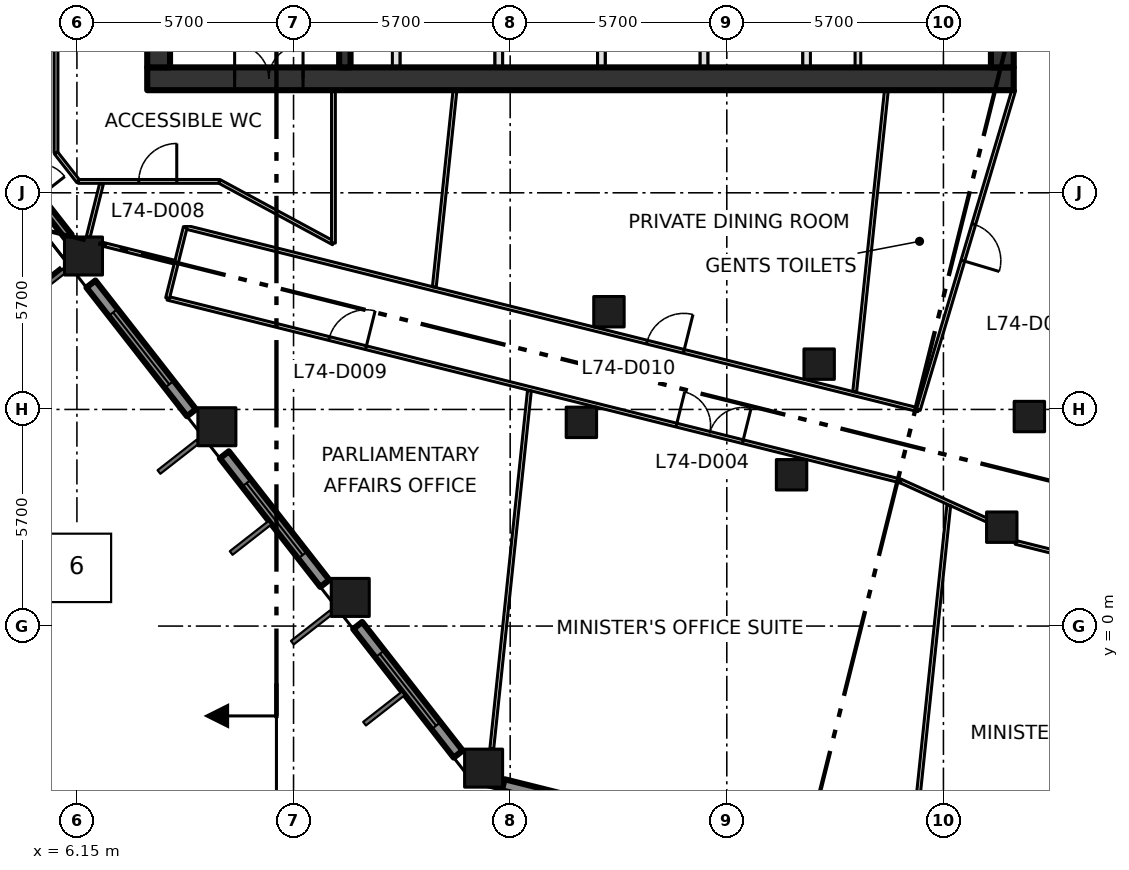
"""IFC4 building model, lengths in metres.
Left out: names, types, materials, properties, quantities, classifications, styles, units other than length and angle.
Written with IfcOpenShell. Run it as: python <this file> out.ifc"""

import sys

from ifc_helpers import new_model, si_unit, direction, frame, frame_2d, origin, origin_2d, place, context, subcontext, project, spatial, rectangle, extrude, element, fill, save


model = new_model("IFC4")
c1 = context("Model", 3, precision=1e-05, world=origin(), true_north=direction((0.0, 1.0)))
c2 = subcontext(c1, "Body", "Model", "MODEL_VIEW")
j1 = project(units=[si_unit("LENGTHUNIT", "METRE"), si_unit("PLANEANGLEUNIT", "RADIAN")], contexts=[c1])
p1 = place(None, origin())
s1 = spatial("IfcSite", under=j1, at=p1, CompositionType="ELEMENT")
p2 = place(p1, origin())
s2 = spatial("IfcBuilding", under=s1, at=p2, CompositionType="ELEMENT")
p3 = place(p2, frame((0.0, 0.0, 323.4)))
s3 = spatial("IfcBuildingStorey", under=s2, at=p3, CompositionType="ELEMENT", Elevation=323.4)
for number, where, z_axis, x_axis in (
    (1, (16.851, -3.738, 0.0), (0.0, 0.0, 1.0), (1.0, 0.0, 0.0)),
    (2, (13.342, 0.754, 0.0), (0.0, 0.0, 1.0), (1.0, 0.0, 0.0)),
    (3, (9.833, 5.245, 0.0), (0.0, 0.0, 1.0), (1.0, 0.0, 0.0)),
    (4, (6.323, 9.737, 0.0), (0.0, 0.0, 1.0), (1.0, 0.0, 0.0)),
):
    element("IfcColumn", number, at=place(p3, frame(where, z_axis=z_axis, x_axis=x_axis)), inside=s3, PredefinedType="COLUMN", context=c2, shape_type="SweptSolid", body=[
        extrude(rectangle(XDim=1.0, YDim=1.0, at=origin_2d()), origin(), (0.0, 0.0, 1.0), 4.2),
    ])
for number, where, z_axis, x_axis in (
    (5, (19.424, 5.36, 0.0), (0.0, 0.0, 1.0), (1.0, 0.0, 0.0)),
    (6, (24.954, 3.981, 0.0), (0.0, 0.0, 1.0), (1.0, 0.0, 0.0)),
    (7, (30.485, 2.602, 0.0), (0.0, 0.0, 1.0), (1.0, 0.0, 0.0)),
    (8, (20.149, 8.271, 0.0), (0.0, 0.0, 1.0), (1.0, 0.0, 0.0)),
    (9, (25.68, 6.892, 0.0), (0.0, 0.0, 1.0), (1.0, 0.0, 0.0)),
    (10, (31.211, 5.513, 0.0), (0.0, 0.0, 1.0), (1.0, 0.0, 0.0)),
):
    element("IfcColumn", number, at=place(p3, frame(where, z_axis=z_axis, x_axis=x_axis)), inside=s3, PredefinedType="COLUMN", context=c2, shape_type="SweptSolid", body=[
        extrude(rectangle(XDim=0.8, YDim=0.8, at=origin_2d()), origin(), (0.0, 0.0, 1.0), 4.2),
    ])
p4 = place(p3, frame((8.0, 14.4, -0.3), z_axis=(0.0, 0.0, 1.0), x_axis=(1.0, 0.0, 0.0)))
e11 = element("IfcWall", 11, at=p4, inside=s3, PredefinedType="SHEAR", context=c2, shape_type="SweptSolid", body=[
    extrude(rectangle(XDim=22.8, YDim=0.6, at=frame_2d((11.4, 0.0))), origin(), (0.0, 0.0, 1.0), 4.2),
])
p5 = place(p4, frame((2.3, 0.0, 0.3)))
e12 = element("IfcOpeningElement", 12, at=p5, cuts=e11, PredefinedType="OPENING", context=c2, shape_type="SweptSolid", body=[
    extrude(rectangle(XDim=1.8, YDim=2.1, at=frame_2d((0.9, 1.05))), frame((0.0, 0.31, 0.0), z_axis=(0.0, -1.0, 0.0), x_axis=(1.0, 0.0, 0.0)), (0.0, 0.0, 1.0), 0.62),
])
for number, where, z_axis, x_axis in (
    (13, (8.3, 14.7, -0.3), (0.0, 0.0, 1.0), (0.0, 1.0, 0.0)),
    (14, (30.5, 14.7, -0.3), (0.0, 0.0, 1.0), (0.0, 1.0, 0.0)),
):
    element("IfcWall", number, at=place(p3, frame(where, z_axis=z_axis, x_axis=x_axis)), inside=s3, PredefinedType="SHEAR", context=c2, shape_type="SweptSolid", body=[
        extrude(rectangle(XDim=21.0, YDim=0.6, at=frame_2d((10.5, 0.0))), origin(), (0.0, 0.0, 1.0), 4.2),
    ])
p6 = place(p3, frame((13.2, 14.7, 0.0), z_axis=(0.0, 0.0, 1.0), x_axis=(0.0, 1.0, 0.0)))
e15 = element("IfcWall", 15, at=p6, inside=s3, PredefinedType="SHEAR", context=c2, shape_type="SweptSolid", body=[
    extrude(rectangle(XDim=21.0, YDim=0.3, at=frame_2d((10.5, 0.0))), origin(), (0.0, 0.0, 1.0), 3.9),
])
p7 = place(p6, frame((3.6, 0.0, 0.0)))
e16 = element("IfcOpeningElement", 16, at=p7, cuts=e15, PredefinedType="OPENING", context=c2, shape_type="SweptSolid", body=[
    extrude(rectangle(XDim=1.8, YDim=2.1, at=frame_2d((0.9, 1.05))), frame((0.0, 0.16, 0.0), z_axis=(0.0, -1.0, 0.0), x_axis=(1.0, 0.0, 0.0)), (0.0, 0.0, 1.0), 0.32),
])
p8 = place(p6, frame((11.7, 0.0, 0.0)))
e17 = element("IfcOpeningElement", 17, at=p8, cuts=e15, PredefinedType="OPENING", context=c2, shape_type="SweptSolid", body=[
    extrude(rectangle(XDim=1.2, YDim=2.1, at=frame_2d((0.6, 1.05))), frame((0.0, 0.16, 0.0), z_axis=(0.0, -1.0, 0.0), x_axis=(1.0, 0.0, 0.0)), (0.0, 0.0, 1.0), 0.32),
])
for number, where, z_axis, x_axis in (
    (18, (14.55, 14.7, 0.0), (0.0, 0.0, 1.0), (0.0, 1.0, 0.0)),
    (19, (17.25, 14.7, 0.0), (0.0, 0.0, 1.0), (0.0, 1.0, 0.0)),
    (20, (19.95, 14.7, 0.0), (0.0, 0.0, 1.0), (0.0, 1.0, 0.0)),
    (21, (22.65, 14.7, 0.0), (0.0, 0.0, 1.0), (0.0, 1.0, 0.0)),
    (22, (25.35, 14.7, 0.0), (0.0, 0.0, 1.0), (0.0, 1.0, 0.0)),
):
    element("IfcWall", number, at=place(p3, frame(where, z_axis=z_axis, x_axis=x_axis)), inside=s3, PredefinedType="SOLIDWALL", context=c2, shape_type="SweptSolid", body=[
        extrude(rectangle(XDim=2.9, YDim=0.2, at=frame_2d((1.45, 0.0))), origin(), (0.0, 0.0, 1.0), 3.9),
    ])
p9 = place(p3, frame((26.7, 14.7, 0.0), z_axis=(0.0, 0.0, 1.0), x_axis=(0.0, 1.0, 0.0)))
e23 = element("IfcWall", 23, at=p9, inside=s3, PredefinedType="PARTITIONING", context=c2, shape_type="SweptSolid", body=[
    extrude(rectangle(XDim=2.9, YDim=0.15, at=frame_2d((1.45, 0.0))), origin(), (0.0, 0.0, 1.0), 3.9),
])
p10 = place(p3, frame((3.205, 13.729, 0.0), z_axis=(0.0, 0.0, 1.0), x_axis=(0.615636557784, -0.788030220689, 0.0)))
e24 = element("IfcWall", 24, at=p10, inside=s3, PredefinedType="SOLIDWALL", context=c2, shape_type="SweptSolid", body=[
    extrude(rectangle(XDim=4.431, YDim=0.2, at=frame_2d((2.216, 0.0))), origin(), (0.0, 0.0, 1.0), 3.2),
])
p11 = place(p10, frame((1.315, 0.0, 0.0)))
e25 = element("IfcOpeningElement", 25, at=p11, cuts=e24, PredefinedType="OPENING", context=c2, shape_type="SweptSolid", body=[
    extrude(rectangle(XDim=1.8, YDim=2.9, at=frame_2d((0.9, 1.45))), frame((0.0, 0.11, 0.0), z_axis=(0.0, -1.0, 0.0), x_axis=(1.0, 0.0, 0.0)), (0.0, 0.0, 1.0), 0.22),
])
p12 = place(p3, frame((6.519, 9.0, 0.0), z_axis=(0.0, 0.0, 1.0), x_axis=(0.615634121154, -0.788032124263, 0.0)))
e26 = element("IfcWall", 26, at=p12, inside=s3, PredefinedType="SOLIDWALL", context=c2, shape_type="SweptSolid", body=[
    extrude(rectangle(XDim=4.298, YDim=0.3, at=frame_2d((2.149, 0.0))), origin(), (0.0, 0.0, 1.0), 3.2),
])
p13 = place(p12, frame((0.949, 0.0, 0.8)))
e27 = element("IfcOpeningElement", 27, at=p13, cuts=e26, PredefinedType="OPENING", context=c2, shape_type="SweptSolid", body=[
    extrude(rectangle(XDim=2.4, YDim=2.1, at=frame_2d((1.2, 1.05))), frame((0.0, 0.16, 0.0), z_axis=(0.0, -1.0, 0.0), x_axis=(1.0, 0.0, 0.0)), (0.0, 0.0, 1.0), 0.32),
])
p14 = place(p3, frame((10.029, 4.507, 0.0), z_axis=(0.0, 0.0, 1.0), x_axis=(0.615572343689, -0.788080382756, 0.0)))
e28 = element("IfcWall", 28, at=p14, inside=s3, PredefinedType="SOLIDWALL", context=c2, shape_type="SweptSolid", body=[
    extrude(rectangle(XDim=4.295, YDim=0.3, at=frame_2d((2.147, 0.0))), origin(), (0.0, 0.0, 1.0), 3.2),
])
p15 = place(p14, frame((0.948, 0.0, 0.8)))
e29 = element("IfcOpeningElement", 29, at=p15, cuts=e28, PredefinedType="OPENING", context=c2, shape_type="SweptSolid", body=[
    extrude(rectangle(XDim=2.4, YDim=2.1, at=frame_2d((1.2, 1.05))), frame((0.0, 0.16, 0.0), z_axis=(0.0, -1.0, 0.0), x_axis=(1.0, 0.0, 0.0)), (0.0, 0.0, 1.0), 0.32),
])
p16 = place(p3, frame((13.538, 0.016, 0.0), z_axis=(0.0, 0.0, 1.0), x_axis=(0.615713519567, -0.787970089421, 0.0)))
e30 = element("IfcWall", 30, at=p16, inside=s3, PredefinedType="SOLIDWALL", context=c2, shape_type="SweptSolid", body=[
    extrude(rectangle(XDim=4.296, YDim=0.3, at=frame_2d((2.148, 0.0))), origin(), (0.0, 0.0, 1.0), 3.2),
])
p17 = place(p16, frame((0.948, 0.0, 0.8)))
e31 = element("IfcOpeningElement", 31, at=p17, cuts=e30, PredefinedType="OPENING", context=c2, shape_type="SweptSolid", body=[
    extrude(rectangle(XDim=2.4, YDim=2.1, at=frame_2d((1.2, 1.05))), frame((0.0, 0.16, 0.0), z_axis=(0.0, -1.0, 0.0), x_axis=(1.0, 0.0, 0.0)), (0.0, 0.0, 1.0), 0.32),
])
p18 = place(p3, frame((17.367, -4.176, 0.0), z_axis=(0.0, 0.0, 1.0), x_axis=(0.970327846266, -0.241793032904, 0.0)))
e32 = element("IfcWall", 32, at=p18, inside=s3, PredefinedType="SOLIDWALL", context=c2, shape_type="SweptSolid", body=[
    extrude(rectangle(XDim=4.487, YDim=0.3, at=frame_2d((2.244, 0.0))), origin(), (0.0, 0.0, 1.0), 3.2),
])
p19 = place(p18, frame((1.044, 0.0, 0.8)))
e33 = element("IfcOpeningElement", 33, at=p19, cuts=e32, PredefinedType="OPENING", context=c2, shape_type="SweptSolid", body=[
    extrude(rectangle(XDim=2.4, YDim=2.1, at=frame_2d((1.2, 1.05))), frame((0.0, 0.16, 0.0), z_axis=(0.0, -1.0, 0.0), x_axis=(1.0, 0.0, 0.0)), (0.0, 0.0, 1.0), 0.32),
])
p20 = place(p3, frame((5.6, 12.45, 0.0), z_axis=(0.0, 0.0, 1.0), x_axis=(0.0, 1.0, 0.0)))
e34 = element("IfcWall", 34, at=p20, inside=s3, PredefinedType="PARTITIONING", context=c2, shape_type="SweptSolid", body=[
    extrude(rectangle(XDim=26.85, YDim=0.1, at=frame_2d((13.425, 0.0))), origin(), (0.0, 0.0, 1.0), 3.9),
])
p21 = place(p20, frame((5.38, 0.0, 0.0)))
e35 = element("IfcOpeningElement", 35, at=p21, cuts=e34, PredefinedType="OPENING", context=c2, shape_type="SweptSolid", body=[
    extrude(rectangle(XDim=1.0, YDim=2.1, at=frame_2d((0.5, 1.05))), frame((0.0, 0.06, 0.0), z_axis=(0.0, -1.0, 0.0), x_axis=(1.0, 0.0, 0.0)), (0.0, 0.0, 1.0), 0.12),
])
p22 = place(p20, frame((16.639, 0.0, 0.0)))
e36 = element("IfcOpeningElement", 36, at=p22, cuts=e34, PredefinedType="OPENING", context=c2, shape_type="SweptSolid", body=[
    extrude(rectangle(XDim=1.0, YDim=2.1, at=frame_2d((0.5, 1.05))), frame((0.0, 0.06, 0.0), z_axis=(0.0, -1.0, 0.0), x_axis=(1.0, 0.0, 0.0)), (0.0, 0.0, 1.0), 0.12),
])
p23 = place(p20, frame((24.139, 0.0, 0.0)))
e37 = element("IfcOpeningElement", 37, at=p23, cuts=e34, PredefinedType="OPENING", context=c2, shape_type="SweptSolid", body=[
    extrude(rectangle(XDim=1.0, YDim=2.1, at=frame_2d((0.5, 1.05))), frame((0.0, 0.06, 0.0), z_axis=(0.0, -1.0, 0.0), x_axis=(1.0, 0.0, 0.0)), (0.0, 0.0, 1.0), 0.12),
])
p24 = place(p3, frame((5.6, 12.45, 0.0), z_axis=(0.0, 0.0, 1.0), x_axis=(0.615644041972, -0.788024373725, 0.0)))
e38 = element("IfcWall", 38, at=p24, inside=s3, PredefinedType="PARTITIONING", context=c2, shape_type="SweptSolid", body=[
    extrude(rectangle(XDim=0.952, YDim=0.1, at=frame_2d((0.476, 0.0))), origin(), (0.0, 0.0, 1.0), 3.9),
])
p25 = place(p3, frame((6.186, 11.7, 0.0), z_axis=(0.0, 0.0, 1.0), x_axis=(1.0, 0.0, 0.0)))
e39 = element("IfcWall", 39, at=p25, inside=s3, PredefinedType="PARTITIONING", context=c2, shape_type="SweptSolid", body=[
    extrude(rectangle(XDim=3.714, YDim=0.1, at=frame_2d((1.857, 0.0))), origin(), (0.0, 0.0, 1.0), 3.9),
])
p26 = place(p25, frame((1.591, 0.0, 0.0)))
e40 = element("IfcOpeningElement", 40, at=p26, cuts=e39, PredefinedType="OPENING", context=c2, shape_type="SweptSolid", body=[
    extrude(rectangle(XDim=1.0, YDim=2.1, at=frame_2d((0.5, 1.05))), frame((0.0, 0.06, 0.0), z_axis=(0.0, -1.0, 0.0), x_axis=(1.0, 0.0, 0.0)), (0.0, 0.0, 1.0), 0.12),
])
p27 = place(p3, frame((8.535, 8.626, 0.0), z_axis=(0.0, 0.0, 1.0), x_axis=(0.970298340477, -0.241911410372, 0.0)))
e41 = element("IfcWall", 41, at=p27, inside=s3, PredefinedType="PARTITIONING", context=c2, shape_type="SweptSolid", body=[
    extrude(rectangle(XDim=19.88, YDim=0.1, at=frame_2d((9.94, 0.0))), origin(), (0.0, 0.0, 1.0), 3.9),
])
p28 = place(p27, frame((13.799, 0.0, 0.0)))
e42 = element("IfcOpeningElement", 42, at=p28, cuts=e41, PredefinedType="OPENING", context=c2, shape_type="SweptSolid", body=[
    extrude(rectangle(XDim=1.8, YDim=2.1, at=frame_2d((0.9, 1.05))), frame((0.0, 0.06, 0.0), z_axis=(0.0, -1.0, 0.0), x_axis=(1.0, 0.0, 0.0)), (0.0, 0.0, 1.0), 0.12),
])
p29 = place(p27, frame((4.38, 0.0, 0.0)))
e43 = element("IfcOpeningElement", 43, at=p29, cuts=e41, PredefinedType="OPENING", context=c2, shape_type="SweptSolid", body=[
    extrude(rectangle(XDim=1.0, YDim=2.1, at=frame_2d((0.5, 1.05))), frame((0.0, 0.06, 0.0), z_axis=(0.0, -1.0, 0.0), x_axis=(1.0, 0.0, 0.0)), (0.0, 0.0, 1.0), 0.12),
])
p30 = place(p3, frame((9.002, 10.499, 0.0), z_axis=(0.0, 0.0, 1.0), x_axis=(0.970298340477, -0.241911410372, 0.0)))
e44 = element("IfcWall", 44, at=p30, inside=s3, PredefinedType="PARTITIONING", context=c2, shape_type="SweptSolid", body=[
    extrude(rectangle(XDim=19.88, YDim=0.1, at=frame_2d((9.94, 0.0))), origin(), (0.0, 0.0, 1.0), 3.9),
])
p31 = place(p30, frame((12.518, 0.0, 0.0)))
e45 = element("IfcOpeningElement", 45, at=p31, cuts=e44, PredefinedType="OPENING", context=c2, shape_type="SweptSolid", body=[
    extrude(rectangle(XDim=1.0, YDim=2.1, at=frame_2d((0.5, 1.05))), frame((0.0, 0.06, 0.0), z_axis=(0.0, -1.0, 0.0), x_axis=(1.0, 0.0, 0.0)), (0.0, 0.0, 1.0), 0.12),
])
p32 = place(p3, frame((9.002, 10.499, 0.0), z_axis=(0.0, 0.0, 1.0), x_axis=(-0.241940418317, -0.970291107856, 0.0)))
e46 = element("IfcWall", 46, at=p32, inside=s3, PredefinedType="PARTITIONING", context=c2, shape_type="SweptSolid", body=[
    extrude(rectangle(XDim=1.93, YDim=0.1, at=frame_2d((0.965, 0.0))), origin(), (0.0, 0.0, 1.0), 3.9),
])
p33 = place(p3, frame((9.9, 11.7, 0.0), z_axis=(0.0, 0.0, 1.0), x_axis=(0.87965147249, -0.475618846291, 0.0)))
e47 = element("IfcWall", 47, at=p33, inside=s3, PredefinedType="PARTITIONING", context=c2, shape_type="SweptSolid", body=[
    extrude(rectangle(XDim=3.41, YDim=0.1, at=frame_2d((1.705, 0.0))), origin(), (0.0, 0.0, 1.0), 3.9),
])
p34 = place(p3, frame((12.9, 10.078, 0.0), z_axis=(0.0, 0.0, 1.0), x_axis=(0.0, 1.0, 0.0)))
e48 = element("IfcWall", 48, at=p34, inside=s3, PredefinedType="PARTITIONING", context=c2, shape_type="SweptSolid", body=[
    extrude(rectangle(XDim=4.022, YDim=0.1, at=frame_2d((2.011, 0.0))), origin(), (0.0, 0.0, 1.0), 3.9),
])
p35 = place(p3, frame((27.824, 3.817, 0.0), z_axis=(0.0, 0.0, 1.0), x_axis=(0.910793734201, -0.41286168839, 0.0)))
e49 = element("IfcWall", 49, at=p35, inside=s3, PredefinedType="PARTITIONING", context=c2, shape_type="SweptSolid", body=[
    extrude(rectangle(XDim=2.482, YDim=0.1, at=frame_2d((1.241, 0.0))), origin(), (0.0, 0.0, 1.0), 3.9),
])
p36 = place(p3, frame((30.8, 14.1, 0.0), z_axis=(0.0, 0.0, 1.0), x_axis=(-0.28588265334, -0.958264633867, 0.0)))
e50 = element("IfcWall", 50, at=p36, inside=s3, PredefinedType="PARTITIONING", context=c2, shape_type="SweptSolid", body=[
    extrude(rectangle(XDim=8.776, YDim=0.1, at=frame_2d((4.388, 0.0))), origin(), (0.0, 0.0, 1.0), 3.9),
])
p37 = place(p36, frame((3.68, 0.0, 0.0)))
e51 = element("IfcOpeningElement", 51, at=p37, cuts=e50, PredefinedType="OPENING", context=c2, shape_type="SweptSolid", body=[
    extrude(rectangle(XDim=1.0, YDim=2.1, at=frame_2d((0.5, 1.05))), frame((0.0, 0.06, 0.0), z_axis=(0.0, -1.0, 0.0), x_axis=(1.0, 0.0, 0.0)), (0.0, 0.0, 1.0), 0.12),
])
p38 = place(p3, frame((30.849, 2.202, 0.0), z_axis=(0.0, 0.0, 1.0), x_axis=(0.970320559999, -0.241822271189, 0.0)))
e52 = element("IfcWall", 52, at=p38, inside=s3, PredefinedType="PARTITIONING", context=c2, shape_type="SweptSolid", body=[
    extrude(rectangle(XDim=4.913, YDim=0.1, at=frame_2d((2.456, 0.0))), origin(), (0.0, 0.0, 1.0), 3.9),
])
p39 = place(p3, frame((6.797, 11.638, 0.0), z_axis=(0.0, 0.0, 1.0), x_axis=(-0.242456058691, -0.970162388265, 0.0)))
e53 = element("IfcWall", 53, at=p39, inside=s3, PredefinedType="PARTITIONING", context=c2, shape_type="SweptSolid", body=[
    extrude(rectangle(XDim=1.444, YDim=0.1, at=frame_2d((0.722, 0.0))), origin(), (0.0, 0.0, 1.0), 3.9),
])
p40 = place(p3, frame((8.72, 9.575, 0.0), z_axis=(0.0, 0.0, 1.0), x_axis=(-0.970274576003, 0.242006708918, 0.0)))
e54 = element("IfcWall", 54, at=p40, inside=s3, PredefinedType="PARTITIONING", context=c2, shape_type="SweptSolid", body=[
    extrude(rectangle(XDim=1.955, YDim=0.1, at=frame_2d((0.978, 0.0))), origin(), (0.0, 0.0, 1.0), 3.9),
])
p41 = place(p3, frame((15.554, 8.924, 0.0), z_axis=(0.0, 0.0, 1.0), x_axis=(0.104513853303, 0.994523430829, 0.0)))
e55 = element("IfcWall", 55, at=p41, inside=s3, PredefinedType="PARTITIONING", context=c2, shape_type="SweptSolid", body=[
    extrude(rectangle(XDim=5.205, YDim=0.1, at=frame_2d((2.602, 0.0))), origin(), (0.0, 0.0, 1.0), 3.9),
])
p42 = place(p3, frame((17.065, -3.238, 0.0), z_axis=(0.0, 0.0, 1.0), x_axis=(0.104487801341, 0.994526168269, 0.0)))
e56 = element("IfcWall", 56, at=p42, inside=s3, PredefinedType="PARTITIONING", context=c2, shape_type="SweptSolid", body=[
    extrude(rectangle(XDim=9.484, YDim=0.1, at=frame_2d((4.742, 0.0))), origin(), (0.0, 0.0, 1.0), 3.9),
])
p43 = place(p3, frame((26.615, 6.166, 0.0), z_axis=(0.0, 0.0, 1.0), x_axis=(0.10453822663, 0.994520869149, 0.0)))
e57 = element("IfcWall", 57, at=p43, inside=s3, PredefinedType="PARTITIONING", context=c2, shape_type="SweptSolid", body=[
    extrude(rectangle(XDim=7.978, YDim=0.1, at=frame_2d((3.989, 0.0))), origin(), (0.0, 0.0, 1.0), 3.9),
])
p44 = place(p3, frame((28.127, -5.996, 0.0), z_axis=(0.0, 0.0, 1.0), x_axis=(0.104490376754, 0.994525897685, 0.0)))
e58 = element("IfcWall", 58, at=p44, inside=s3, PredefinedType="PARTITIONING", context=c2, shape_type="SweptSolid", body=[
    extrude(rectangle(XDim=9.218, YDim=0.1, at=frame_2d((4.609, 0.0))), origin(), (0.0, 0.0, 1.0), 3.9),
])
p45 = place(p5, origin())
e59 = element("IfcDoor", 59, at=p45, inside=s3, OperationType="DOUBLE_DOOR_SINGLE_SWING", PredefinedType="DOOR", context=c2, shape_type="SweptSolid", body=[
    extrude(rectangle(XDim=1.8, YDim=2.1, at=frame_2d((0.9, 1.05))), frame((0.0, 0.025, 0.0), z_axis=(0.0, -1.0, 0.0), x_axis=(1.0, 0.0, 0.0)), (0.0, 0.0, 1.0), 0.05),
])
fill(e12, e59)
p46 = place(p13, origin())
e60 = element("IfcWindow", 60, at=p46, inside=s3, PartitioningType="DOUBLE_PANEL_VERTICAL", PredefinedType="WINDOW", context=c2, shape_type="SweptSolid", body=[
    extrude(rectangle(XDim=2.4, YDim=2.1, at=frame_2d((1.2, 1.05))), frame((0.0, 0.03, 0.0), z_axis=(0.0, -1.0, 0.0), x_axis=(1.0, 0.0, 0.0)), (0.0, 0.0, 1.0), 0.06),
])
fill(e27, e60)
p47 = place(p15, origin())
e61 = element("IfcWindow", 61, at=p47, inside=s3, PartitioningType="DOUBLE_PANEL_VERTICAL", PredefinedType="WINDOW", context=c2, shape_type="SweptSolid", body=[
    extrude(rectangle(XDim=2.4, YDim=2.1, at=frame_2d((1.2, 1.05))), frame((0.0, 0.03, 0.0), z_axis=(0.0, -1.0, 0.0), x_axis=(1.0, 0.0, 0.0)), (0.0, 0.0, 1.0), 0.06),
])
fill(e29, e61)
p48 = place(p17, origin())
e62 = element("IfcWindow", 62, at=p48, inside=s3, PartitioningType="DOUBLE_PANEL_VERTICAL", PredefinedType="WINDOW", context=c2, shape_type="SweptSolid", body=[
    extrude(rectangle(XDim=2.4, YDim=2.1, at=frame_2d((1.2, 1.05))), frame((0.0, 0.03, 0.0), z_axis=(0.0, -1.0, 0.0), x_axis=(1.0, 0.0, 0.0)), (0.0, 0.0, 1.0), 0.06),
])
fill(e31, e62)
p49 = place(p28, origin())
e63 = element("IfcDoor", 63, at=p49, inside=s3, OperationType="DOUBLE_DOOR_SINGLE_SWING", PredefinedType="DOOR", context=c2, shape_type="SweptSolid", body=[
    extrude(rectangle(XDim=1.8, YDim=2.1, at=frame_2d((0.9, 1.05))), frame((0.0, 0.025, 0.0), z_axis=(0.0, -1.0, 0.0), x_axis=(1.0, 0.0, 0.0)), (0.0, 0.0, 1.0), 0.05),
])
fill(e42, e63)
p50 = place(p26, origin())
e64 = element("IfcDoor", 64, at=p50, inside=s3, OperationType="SINGLE_SWING_RIGHT", PredefinedType="DOOR", context=c2, shape_type="SweptSolid", body=[
    extrude(rectangle(XDim=1.0, YDim=2.1, at=frame_2d((0.5, 1.05))), frame((0.0, 0.025, 0.0), z_axis=(0.0, -1.0, 0.0), x_axis=(1.0, 0.0, 0.0)), (0.0, 0.0, 1.0), 0.05),
])
fill(e40, e64)
p51 = place(p29, origin())
e65 = element("IfcDoor", 65, at=p51, inside=s3, OperationType="SINGLE_SWING_RIGHT", PredefinedType="DOOR", context=c2, shape_type="SweptSolid", body=[
    extrude(rectangle(XDim=1.0, YDim=2.1, at=frame_2d((0.5, 1.05))), frame((0.0, 0.025, 0.0), z_axis=(0.0, -1.0, 0.0), x_axis=(1.0, 0.0, 0.0)), (0.0, 0.0, 1.0), 0.05),
])
fill(e43, e65)
p52 = place(p31, origin())
e66 = element("IfcDoor", 66, at=p52, inside=s3, OperationType="SINGLE_SWING_RIGHT", PredefinedType="DOOR", context=c2, shape_type="SweptSolid", body=[
    extrude(rectangle(XDim=1.0, YDim=2.1, at=frame_2d((0.5, 1.05))), frame((0.0, 0.025, 0.0), z_axis=(0.0, -1.0, 0.0), x_axis=(1.0, 0.0, 0.0)), (0.0, 0.0, 1.0), 0.05),
])
fill(e45, e66)
p53 = place(p37, origin())
e67 = element("IfcDoor", 67, at=p53, inside=s3, OperationType="SINGLE_SWING_RIGHT", PredefinedType="DOOR", context=c2, shape_type="SweptSolid", body=[
    extrude(rectangle(XDim=1.0, YDim=2.1, at=frame_2d((0.5, 1.05))), frame((0.0, 0.025, 0.0), z_axis=(0.0, -1.0, 0.0), x_axis=(1.0, 0.0, 0.0)), (0.0, 0.0, 1.0), 0.05),
])
fill(e51, e67)
save(model, sys.argv[1])
